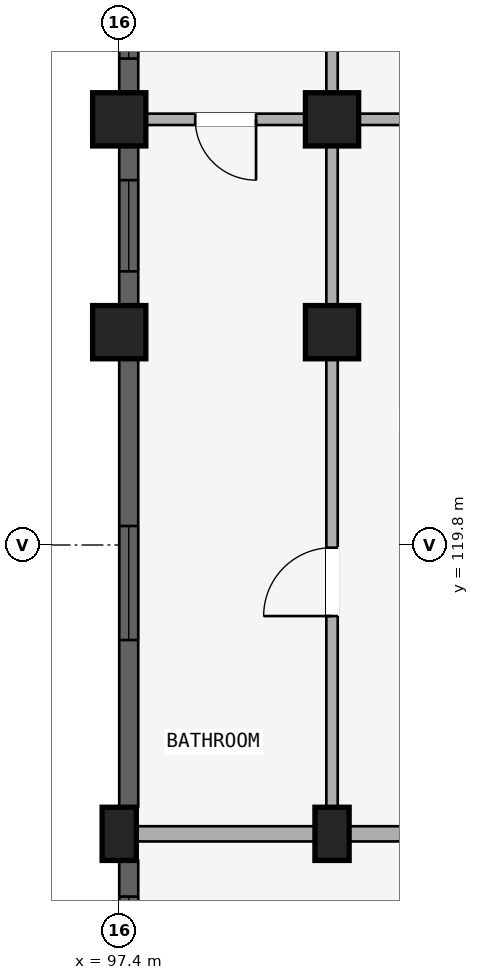
"""IFC4 building model, lengths in metres.
Left out: names, types, materials, properties, quantities, classifications, styles, units other than length and angle.
Written with IfcOpenShell. Run it as: python <this file> out.ifc"""

import sys

from ifc_helpers import new_model, si_unit, direction, frame, frame_2d, origin, origin_2d, place, context, subcontext, project, spatial, rectangle, extrude, element, fill, save


model = new_model("IFC4")
c1 = context("Model", 3, precision=1e-05, world=origin(), true_north=direction((0.0, 1.0)))
c2 = subcontext(c1, "Body", "Model", "MODEL_VIEW")
j1 = project(units=[si_unit("LENGTHUNIT", "METRE"), si_unit("PLANEANGLEUNIT", "RADIAN")], contexts=[c1])
p1 = place(None, origin())
s1 = spatial("IfcSite", under=j1, at=p1, CompositionType="ELEMENT")
p2 = place(p1, origin())
s2 = spatial("IfcBuilding", under=s1, at=p2, CompositionType="ELEMENT")
p3 = place(p2, frame((0.0, 0.0, 24.45)))
s3 = spatial("IfcBuildingStorey", under=s2, at=p3, CompositionType="ELEMENT", Elevation=24.45)
p4 = place(p3, frame((100.2, 116.0, 0.0), z_axis=(0.0, 0.0, 1.0), x_axis=(1.0, 0.0, 0.0)))
e1 = element("IfcColumn", 1, at=p4, inside=s3, PredefinedType="COLUMN", context=c2, shape_type="SweptSolid", body=[
    extrude(rectangle(XDim=0.45, YDim=0.7, at=origin_2d()), origin(), (0.0, 0.0, 1.0), 2.93),
])
for number, where, z_axis, x_axis in (
    (2, (100.2, 122.6, 0.0), (0.0, 0.0, 1.0), (1.0, 0.0, 0.0)),
    (3, (100.2, 125.4, 0.0), (0.0, 0.0, 1.0), (1.0, 0.0, 0.0)),
):
    element("IfcColumn", number, at=place(p3, frame(where, z_axis=z_axis, x_axis=x_axis)), inside=s3, PredefinedType="COLUMN", context=c2, shape_type="SweptSolid", body=[
        extrude(rectangle(XDim=0.7, YDim=0.7, at=origin_2d()), origin(), (0.0, 0.0, 1.0), 2.93),
    ])
p5 = place(p3, frame((97.4, 116.0, 0.0), z_axis=(0.0, 0.0, 1.0), x_axis=(1.0, 0.0, 0.0)))
e4 = element("IfcColumn", 4, at=p5, inside=s3, PredefinedType="COLUMN", context=c2, shape_type="SweptSolid", body=[
    extrude(rectangle(XDim=0.45, YDim=0.7, at=origin_2d()), origin(), (0.0, 0.0, 1.0), 2.93),
])
for number, where, z_axis, x_axis in (
    (5, (97.4, 122.6, 0.0), (0.0, 0.0, 1.0), (1.0, 0.0, 0.0)),
    (6, (97.4, 125.4, 0.0), (0.0, 0.0, 1.0), (1.0, 0.0, 0.0)),
):
    element("IfcColumn", number, at=place(p3, frame(where, z_axis=z_axis, x_axis=x_axis)), inside=s3, PredefinedType="COLUMN", context=c2, shape_type="SweptSolid", body=[
        extrude(rectangle(XDim=0.7, YDim=0.7, at=origin_2d()), origin(), (0.0, 0.0, 1.0), 2.93),
    ])
p6 = place(p3, frame((103.0, 116.0, 0.0), z_axis=(0.0, 0.0, 1.0), x_axis=(-1.0, 0.0, 0.0)))
e7 = element("IfcWall", 7, at=p6, inside=s3, PredefinedType="STANDARD", context=c2, shape_type="SweptSolid", body=[
    extrude(rectangle(XDim=2.8, YDim=0.2, at=frame_2d((1.4, 0.0))), origin(), (0.0, 0.0, 1.0), 2.372),
])
p7 = place(p6, frame((0.9, 0.0, 0.0)))
e8 = element("IfcOpeningElement", 8, at=p7, cuts=e7, PredefinedType="OPENING", context=c2, shape_type="SweptSolid", body=[
    extrude(rectangle(XDim=1.0, YDim=2.15, at=frame_2d((0.5, 1.075))), frame((0.0, 0.11, 0.0), z_axis=(0.0, -1.0, 0.0), x_axis=(1.0, 0.0, 0.0)), (0.0, 0.0, 1.0), 0.22),
])
p8 = place(p3, frame((102.92, 125.4, 0.0), z_axis=(0.0, 0.0, 1.0), x_axis=(-1.0, 0.0, 0.0)))
e9 = element("IfcWall", 9, at=p8, inside=s3, PredefinedType="PLUMBINGWALL", context=c2, shape_type="SweptSolid", body=[
    extrude(rectangle(XDim=2.64, YDim=0.15, at=frame_2d((1.32, 0.0))), origin(), (0.0, 0.0, 1.0), 2.372),
])
p9 = place(p8, frame((0.87, 0.0, 0.0)))
e10 = element("IfcOpeningElement", 10, at=p9, cuts=e9, PredefinedType="OPENING", context=c2, shape_type="SweptSolid", body=[
    extrude(rectangle(XDim=0.9, YDim=2.1, at=frame_2d((0.45, 1.05))), frame((0.0, 0.085, 0.0), z_axis=(0.0, -1.0, 0.0), x_axis=(1.0, 0.0, 0.0)), (0.0, 0.0, 1.0), 0.17),
])
p10 = place(p3, frame((100.2, 116.0, 0.0), z_axis=(0.0, 0.0, 1.0), x_axis=(-1.0, 0.0, 0.0)))
e11 = element("IfcWall", 11, at=p10, inside=s3, PredefinedType="STANDARD", context=c2, shape_type="SweptSolid", body=[
    extrude(rectangle(XDim=2.8, YDim=0.2, at=frame_2d((1.4, 0.0))), origin(), (0.0, 0.0, 1.0), 2.372),
])
p11 = place(p3, frame((100.12, 125.4, 0.0), z_axis=(0.0, 0.0, 1.0), x_axis=(-1.0, 0.0, 0.0)))
e12 = element("IfcWall", 12, at=p11, inside=s3, PredefinedType="PLUMBINGWALL", context=c2, shape_type="SweptSolid", body=[
    extrude(rectangle(XDim=2.64, YDim=0.15, at=frame_2d((1.32, 0.0))), origin(), (0.0, 0.0, 1.0), 2.372),
])
p12 = place(p11, frame((0.92, 0.0, 0.0)))
e13 = element("IfcOpeningElement", 13, at=p12, cuts=e12, PredefinedType="OPENING", context=c2, shape_type="SweptSolid", body=[
    extrude(rectangle(XDim=0.8, YDim=2.1, at=frame_2d((0.4, 1.05))), frame((0.0, 0.085, 0.0), z_axis=(0.0, -1.0, 0.0), x_axis=(1.0, 0.0, 0.0)), (0.0, 0.0, 1.0), 0.17),
])
p13 = place(p3, frame((100.2, 116.05, 0.0), z_axis=(0.0, 0.0, 1.0), x_axis=(0.0, 1.0, 0.0)))
e14 = element("IfcWall", 14, at=p13, inside=s3, PredefinedType="PARTITIONING", context=c2, shape_type="SweptSolid", body=[
    extrude(rectangle(XDim=6.53, YDim=0.15, at=frame_2d((3.265, 0.0))), origin(), (0.0, 0.0, 1.0), 2.372),
])
p14 = place(p13, frame((2.815, 0.0, 0.0)))
e15 = element("IfcOpeningElement", 15, at=p14, cuts=e14, PredefinedType="OPENING", context=c2, shape_type="SweptSolid", body=[
    extrude(rectangle(XDim=0.9, YDim=2.1, at=frame_2d((0.45, 1.05))), frame((0.0, 0.085, 0.0), z_axis=(0.0, -1.0, 0.0), x_axis=(1.0, 0.0, 0.0)), (0.0, 0.0, 1.0), 0.17),
])
p15 = place(p3, frame((100.2, 122.7, 0.0), z_axis=(0.0, 0.0, 1.0), x_axis=(0.0, 1.0, 0.0)))
e16 = element("IfcWall", 16, at=p15, inside=s3, PredefinedType="PARTITIONING", context=c2, shape_type="SweptSolid", body=[
    extrude(rectangle(XDim=10.82, YDim=0.15, at=frame_2d((5.41, 0.0))), origin(), (0.0, 0.0, 1.0), 2.372),
])
p16 = place(p15, frame((3.7, 0.0, 0.0)))
e17 = element("IfcOpeningElement", 17, at=p16, cuts=e16, PredefinedType="OPENING", context=c2, shape_type="SweptSolid", body=[
    extrude(rectangle(XDim=0.8, YDim=2.1, at=frame_2d((0.4, 1.05))), frame((0.0, 0.085, 0.0), z_axis=(0.0, -1.0, 0.0), x_axis=(1.0, 0.0, 0.0)), (0.0, 0.0, 1.0), 0.17),
])
p17 = place(p3, frame((97.525, 113.954, 0.0), z_axis=(0.0, 0.0, 1.0), x_axis=(0.0, 1.0, 0.0)))
e18 = element("IfcWall", 18, at=p17, inside=s3, PredefinedType="STANDARD", context=c2, shape_type="SweptSolid", body=[
    extrude(rectangle(XDim=1.693, YDim=0.25, at=frame_2d((0.846, 0.0))), origin(), (0.0, 0.0, 1.0), 2.372),
])
p18 = place(p17, frame((0.471, 0.0, 0.88)))
e19 = element("IfcOpeningElement", 19, at=p18, cuts=e18, PredefinedType="OPENING", context=c2, shape_type="SweptSolid", body=[
    extrude(rectangle(XDim=0.75, YDim=1.05, at=frame_2d((0.375, 0.525))), frame((0.0, 0.135, 0.0), z_axis=(0.0, -1.0, 0.0), x_axis=(1.0, 0.0, 0.0)), (0.0, 0.0, 1.0), 0.27),
])
p19 = place(p3, frame((97.525, 116.354, 0.0), z_axis=(0.0, 0.0, 1.0), x_axis=(0.0, 1.0, 0.0)))
e20 = element("IfcWall", 20, at=p19, inside=s3, PredefinedType="STANDARD", context=c2, shape_type="SweptSolid", body=[
    extrude(rectangle(XDim=5.893, YDim=0.25, at=frame_2d((2.947, 0.0))), origin(), (0.0, 0.0, 1.0), 2.372),
])
p20 = place(p19, frame((2.197, 0.0, 0.522)))
e21 = element("IfcOpeningElement", 21, at=p20, cuts=e20, PredefinedType="OPENING", context=c2, shape_type="SweptSolid", body=[
    extrude(rectangle(XDim=1.5, YDim=1.65, at=frame_2d((0.75, 0.825))), frame((0.0, 0.135, 0.0), z_axis=(0.0, -1.0, 0.0), x_axis=(1.0, 0.0, 0.0)), (0.0, 0.0, 1.0), 0.27),
])
p21 = place(p3, frame((97.525, 122.954, 0.0), z_axis=(0.0, 0.0, 1.0), x_axis=(0.0, 1.0, 0.0)))
e22 = element("IfcWall", 22, at=p21, inside=s3, PredefinedType="STANDARD", context=c2, shape_type="SweptSolid", body=[
    extrude(rectangle(XDim=2.093, YDim=0.25, at=frame_2d((1.046, 0.0))), origin(), (0.0, 0.0, 1.0), 2.372),
])
p22 = place(p21, frame((0.447, 0.0, 0.672)))
e23 = element("IfcOpeningElement", 23, at=p22, cuts=e22, PredefinedType="OPENING", context=c2, shape_type="SweptSolid", body=[
    extrude(rectangle(XDim=1.2, YDim=1.5, at=frame_2d((0.6, 0.75))), frame((0.0, 0.135, 0.0), z_axis=(0.0, -1.0, 0.0), x_axis=(1.0, 0.0, 0.0)), (0.0, 0.0, 1.0), 0.27),
])
p23 = place(p3, frame((97.525, 125.753, 0.0), z_axis=(0.0, 0.0, 1.0), x_axis=(0.0, 1.0, 0.0)))
e24 = element("IfcWall", 24, at=p23, inside=s3, PredefinedType="STANDARD", context=c2, shape_type="SweptSolid", body=[
    extrude(rectangle(XDim=2.093, YDim=0.25, at=frame_2d((1.046, 0.0))), origin(), (0.0, 0.0, 1.0), 2.372),
])
p24 = place(p23, frame((0.447, 0.0, 0.672)))
e25 = element("IfcOpeningElement", 25, at=p24, cuts=e24, PredefinedType="OPENING", context=c2, shape_type="SweptSolid", body=[
    extrude(rectangle(XDim=1.2, YDim=1.5, at=frame_2d((0.6, 0.75))), frame((0.0, 0.135, 0.0), z_axis=(0.0, -1.0, 0.0), x_axis=(1.0, 0.0, 0.0)), (0.0, 0.0, 1.0), 0.27),
])
p25 = place(p18, origin())
e26 = element("IfcWindow", 26, at=p25, inside=s3, PartitioningType="SINGLE_PANEL", PredefinedType="WINDOW", context=c2, shape_type="SweptSolid", body=[
    extrude(rectangle(XDim=0.75, YDim=1.05, at=frame_2d((0.375, 0.525))), frame((0.0, 0.03, 0.0), z_axis=(0.0, -1.0, 0.0), x_axis=(1.0, 0.0, 0.0)), (0.0, 0.0, 1.0), 0.06),
])
fill(e19, e26)
p26 = place(p20, origin())
e27 = element("IfcWindow", 27, at=p26, inside=s3, PartitioningType="DOUBLE_PANEL_VERTICAL", PredefinedType="WINDOW", context=c2, shape_type="SweptSolid", body=[
    extrude(rectangle(XDim=1.5, YDim=1.65, at=frame_2d((0.75, 0.825))), frame((0.0, 0.03, 0.0), z_axis=(0.0, -1.0, 0.0), x_axis=(1.0, 0.0, 0.0)), (0.0, 0.0, 1.0), 0.06),
])
fill(e21, e27)
p27 = place(p22, origin())
e28 = element("IfcWindow", 28, at=p27, inside=s3, PartitioningType="SINGLE_PANEL", PredefinedType="WINDOW", context=c2, shape_type="SweptSolid", body=[
    extrude(rectangle(XDim=1.2, YDim=1.5, at=frame_2d((0.6, 0.75))), frame((0.0, 0.03, 0.0), z_axis=(0.0, -1.0, 0.0), x_axis=(1.0, 0.0, 0.0)), (0.0, 0.0, 1.0), 0.06),
])
fill(e23, e28)
p28 = place(p24, origin())
e29 = element("IfcWindow", 29, at=p28, inside=s3, PartitioningType="SINGLE_PANEL", PredefinedType="WINDOW", context=c2, shape_type="SweptSolid", body=[
    extrude(rectangle(XDim=1.2, YDim=1.5, at=frame_2d((0.6, 0.75))), frame((0.0, 0.03, 0.0), z_axis=(0.0, -1.0, 0.0), x_axis=(1.0, 0.0, 0.0)), (0.0, 0.0, 1.0), 0.06),
])
fill(e25, e29)
p29 = place(p12, origin())
e30 = element("IfcDoor", 30, at=p29, inside=s3, OperationType="SINGLE_SWING_LEFT", PredefinedType="DOOR", context=c2, shape_type="SweptSolid", body=[
    extrude(rectangle(XDim=0.8, YDim=2.1, at=frame_2d((0.4, 1.05))), frame((0.0, 0.025, 0.0), z_axis=(0.0, -1.0, 0.0), x_axis=(1.0, 0.0, 0.0)), (0.0, 0.0, 1.0), 0.05),
])
fill(e13, e30)
p30 = place(p14, origin())
e31 = element("IfcDoor", 31, at=p30, inside=s3, OperationType="SINGLE_SWING_LEFT", PredefinedType="DOOR", context=c2, shape_type="SweptSolid", body=[
    extrude(rectangle(XDim=0.9, YDim=2.1, at=frame_2d((0.45, 1.05))), frame((0.0, 0.025, 0.0), z_axis=(0.0, -1.0, 0.0), x_axis=(1.0, 0.0, 0.0)), (0.0, 0.0, 1.0), 0.05),
])
fill(e15, e31)
save(model, sys.argv[1])
